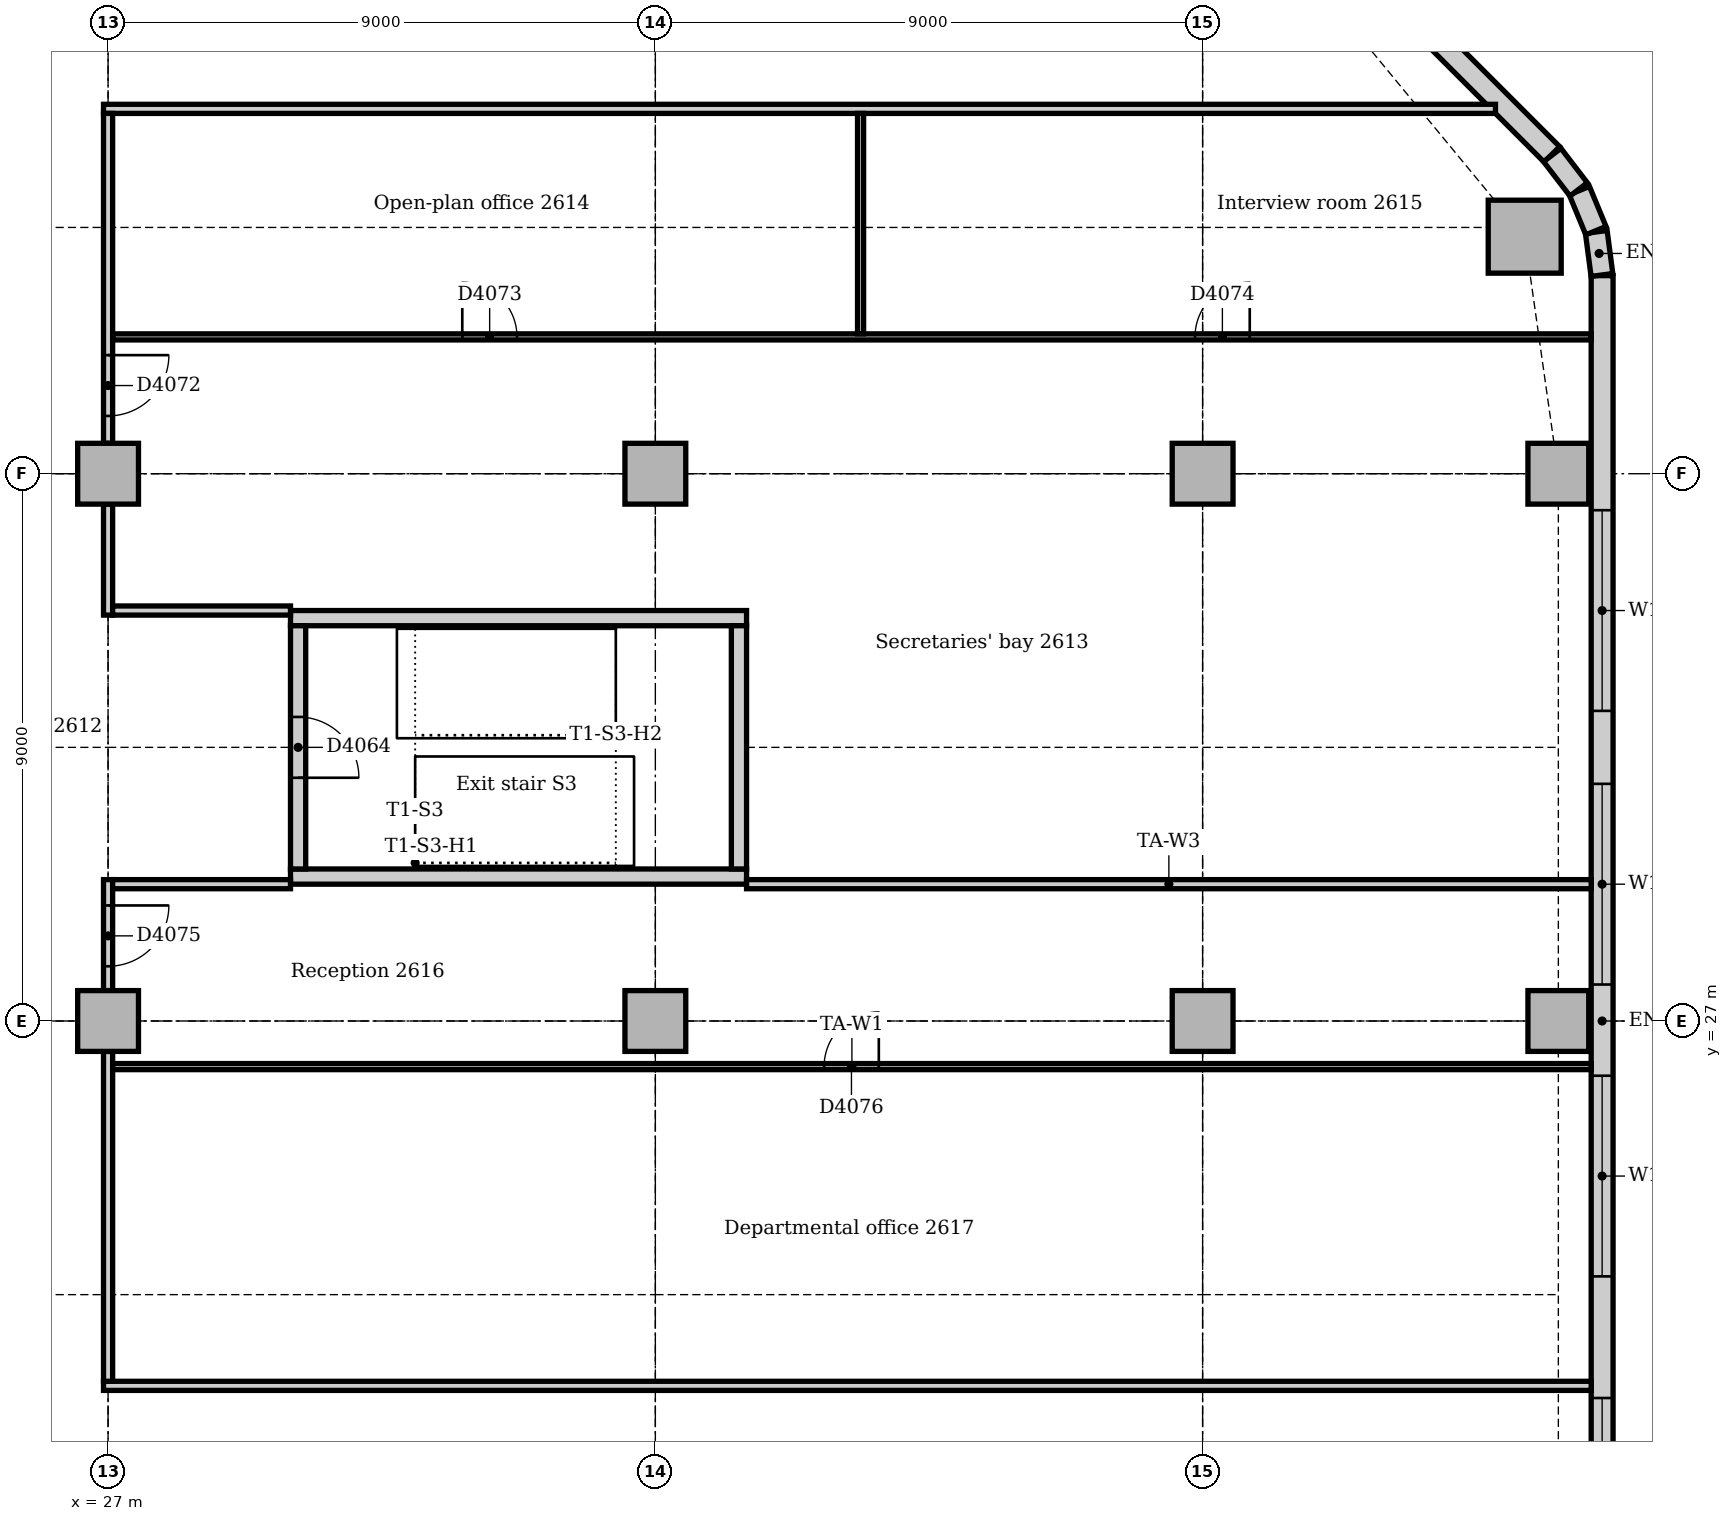
"""IFC4 building model, lengths in metres.
Left out: names, types, materials, properties, quantities, classifications, styles, units other than length and angle.
Written with IfcOpenShell. Run it as: python <this file> out.ifc"""

import sys

from ifc_helpers import new_model, si_unit, direction, frame, frame_2d, origin, origin_2d, place, context, subcontext, project, spatial, rectangle, extrude, element, fill, save


model = new_model("IFC4")
c1 = context("Model", 3, precision=1e-05, world=origin(), true_north=direction((0.0, 1.0)))
c2 = subcontext(c1, "Body", "Model", "MODEL_VIEW")
j1 = project(units=[si_unit("LENGTHUNIT", "METRE"), si_unit("PLANEANGLEUNIT", "RADIAN")], contexts=[c1])
p1 = place(None, origin())
s1 = spatial("IfcSite", under=j1, at=p1, CompositionType="ELEMENT")
p2 = place(p1, origin())
s2 = spatial("IfcBuilding", under=s1, at=p2, CompositionType="ELEMENT")
p3 = place(p2, frame((0.0, 0.0, 112.0)))
s3 = spatial("IfcBuildingStorey", under=s2, at=p3, CompositionType="ELEMENT", Elevation=112.0)
for number, where, z_axis, x_axis in (
    (1, (30.0, 29.375, 0.0), (0.0, 0.0, 1.0), (1.0, 0.0, 0.0)),
    (2, (37.5, 33.625, 0.0), (0.0, 0.0, 1.0), (-1.0, 0.0, 0.0)),
):
    element("IfcWall", number, at=place(p3, frame(where, z_axis=z_axis, x_axis=x_axis)), inside=s3, PredefinedType="SOLIDWALL", context=c2, shape_type="SweptSolid", body=[
        extrude(rectangle(XDim=7.5, YDim=0.25, at=frame_2d((3.75, 0.0))), origin(), (0.0, 0.0, 1.0), 4.0),
    ])
p4 = place(p3, frame((37.375, 29.5, 0.0), z_axis=(0.0, 0.0, 1.0), x_axis=(0.0, 1.0, 0.0)))
e3 = element("IfcWall", 3, at=p4, inside=s3, PredefinedType="SOLIDWALL", context=c2, shape_type="SweptSolid", body=[
    extrude(rectangle(XDim=4.0, YDim=0.25, at=frame_2d((2.0, 0.0))), origin(), (0.0, 0.0, 1.0), 4.0),
])
p5 = place(p3, frame((30.125, 33.5, 0.0), z_axis=(0.0, 0.0, 1.0), x_axis=(0.0, -1.0, 0.0)))
e4 = element("IfcWall", 4, at=p5, inside=s3, PredefinedType="SOLIDWALL", context=c2, shape_type="SweptSolid", body=[
    extrude(rectangle(XDim=4.0, YDim=0.25, at=frame_2d((2.0, 0.0))), origin(), (0.0, 0.0, 1.0), 4.0),
])
p6 = place(p5, frame((1.5, 0.0, 0.0)))
e5 = element("IfcOpeningElement", 5, at=p6, cuts=e4, PredefinedType="OPENING", context=c2, shape_type="SweptSolid", body=[
    extrude(rectangle(XDim=1.0, YDim=2.1, at=frame_2d((0.5, 1.05))), frame((0.0, 0.135, 0.0), z_axis=(0.0, -1.0, 0.0), x_axis=(1.0, 0.0, 0.0)), (0.0, 0.0, 1.0), 0.27),
])
p7 = place(p3, frame((50.297, 39.898, 0.0), z_axis=(0.0, 0.0, 1.0), x_axis=(1.0, 0.0, 0.0)))
e6 = element("IfcColumn", 6, at=p7, inside=s3, PredefinedType="COLUMN", context=c2, shape_type="SweptSolid", body=[
    extrude(rectangle(XDim=1.2, YDim=1.2, at=origin_2d()), origin(), (0.0, 0.0, 1.0), 3.85),
])
for number, where, z_axis, x_axis in (
    (7, (50.85, 27.0, 0.0), (0.0, 0.0, 1.0), (1.0, 0.0, 0.0)),
    (8, (50.85, 36.0, 0.0), (0.0, 0.0, 1.0), (1.0, 0.0, 0.0)),
    (9, (27.0, 27.0, 0.0), (0.0, 0.0, 1.0), (1.0, 0.0, 0.0)),
    (10, (27.0, 36.0, 0.0), (0.0, 0.0, 1.0), (1.0, 0.0, 0.0)),
    (11, (36.0, 27.0, 0.0), (0.0, 0.0, 1.0), (1.0, 0.0, 0.0)),
    (12, (36.0, 36.0, 0.0), (0.0, 0.0, 1.0), (1.0, 0.0, 0.0)),
    (13, (45.0, 27.0, 0.0), (0.0, 0.0, 1.0), (1.0, 0.0, 0.0)),
    (14, (45.0, 36.0, 0.0), (0.0, 0.0, 1.0), (1.0, 0.0, 0.0)),
):
    element("IfcColumn", number, at=place(p3, frame(where, z_axis=z_axis, x_axis=x_axis)), inside=s3, PredefinedType="COLUMN", context=c2, shape_type="SweptSolid", body=[
        extrude(rectangle(XDim=1.0, YDim=1.0, at=origin_2d()), origin(), (0.0, 0.0, 1.0), 3.85),
    ])
p8 = place(p3, frame((51.57, 14.743, 0.0), z_axis=(0.0, 0.0, 1.0), x_axis=(0.0, 1.0, 0.0)))
e15 = element("IfcWall", 15, at=p8, inside=s3, PredefinedType="STANDARD", context=c2, shape_type="SweptSolid", body=[
    extrude(rectangle(XDim=24.515, YDim=0.36, at=frame_2d((12.257, 0.0))), origin(), (0.0, 0.0, 1.0), 3.85),
])
p9 = place(p8, frame((4.257, 0.0, 0.9)))
e16 = element("IfcOpeningElement", 16, at=p9, cuts=e15, PredefinedType="OPENING", context=c2, shape_type="SweptSolid", body=[
    extrude(rectangle(XDim=1.8, YDim=1.6, at=frame_2d((0.9, 0.8))), frame((0.0, 0.19, 0.0), z_axis=(0.0, -1.0, 0.0), x_axis=(1.0, 0.0, 0.0)), (0.0, 0.0, 1.0), 0.38),
])
p10 = place(p8, frame((8.057, 0.0, 0.9)))
e17 = element("IfcOpeningElement", 17, at=p10, cuts=e15, PredefinedType="OPENING", context=c2, shape_type="SweptSolid", body=[
    extrude(rectangle(XDim=3.3, YDim=1.6, at=frame_2d((1.65, 0.8))), frame((0.0, 0.19, 0.0), z_axis=(0.0, -1.0, 0.0), x_axis=(1.0, 0.0, 0.0)), (0.0, 0.0, 1.0), 0.38),
])
p11 = place(p8, frame((12.857, 0.0, 0.9)))
e18 = element("IfcOpeningElement", 18, at=p11, cuts=e15, PredefinedType="OPENING", context=c2, shape_type="SweptSolid", body=[
    extrude(rectangle(XDim=3.3, YDim=1.6, at=frame_2d((1.65, 0.8))), frame((0.0, 0.19, 0.0), z_axis=(0.0, -1.0, 0.0), x_axis=(1.0, 0.0, 0.0)), (0.0, 0.0, 1.0), 0.38),
])
p12 = place(p8, frame((17.357, 0.0, 0.9)))
e19 = element("IfcOpeningElement", 19, at=p12, cuts=e15, PredefinedType="OPENING", context=c2, shape_type="SweptSolid", body=[
    extrude(rectangle(XDim=3.3, YDim=1.6, at=frame_2d((1.65, 0.8))), frame((0.0, 0.19, 0.0), z_axis=(0.0, -1.0, 0.0), x_axis=(1.0, 0.0, 0.0)), (0.0, 0.0, 1.0), 0.38),
])
p13 = place(p3, frame((50.744, 41.251, 0.0), z_axis=(0.0, 0.0, 1.0), x_axis=(-0.707106781187, 0.707106781187, 0.0)))
e20 = element("IfcWall", 20, at=p13, inside=s3, PredefinedType="STANDARD", context=c2, shape_type="SweptSolid", body=[
    extrude(rectangle(XDim=10.243, YDim=0.36, at=frame_2d((5.121, 0.0))), origin(), (0.0, 0.0, 1.0), 3.85),
])
p14 = place(p13, frame((3.471, 0.0, 0.9)))
e21 = element("IfcOpeningElement", 21, at=p14, cuts=e20, PredefinedType="OPENING", context=c2, shape_type="SweptSolid", body=[
    extrude(rectangle(XDim=3.3, YDim=1.6, at=frame_2d((1.65, 0.8))), frame((0.0, 0.19, 0.0), z_axis=(0.0, -1.0, 0.0), x_axis=(1.0, 0.0, 0.0)), (0.0, 0.0, 1.0), 0.38),
])
for number, where, z_axis, x_axis in (
    (22, (51.567, 39.269, 0.0), (0.0, 0.0, 1.0), (-0.131, 0.991, 0.0)),
    (23, (51.468, 39.997, 0.0), (0.0, 0.0, 1.0), (-0.383, 0.924, 0.0)),
):
    element("IfcWall", number, at=place(p3, frame(where, z_axis=z_axis, x_axis=x_axis)), inside=s3, PredefinedType="STANDARD", context=c2, shape_type="SweptSolid", body=[
        extrude(rectangle(XDim=0.713, YDim=0.36, at=frame_2d((0.356, 0.0))), origin(), (0.0, 0.0, 1.0), 3.85),
    ])
p15 = place(p3, frame((51.184, 40.675, 0.0), z_axis=(0.0, 0.0, 1.0), x_axis=(-0.608802368033, 0.793321924995, 0.0)))
e24 = element("IfcWall", 24, at=p15, inside=s3, PredefinedType="STANDARD", context=c2, shape_type="SweptSolid", body=[
    extrude(rectangle(XDim=0.713, YDim=0.36, at=frame_2d((0.357, 0.0))), origin(), (0.0, 0.0, 1.0), 3.85),
])
p16 = place(p3, frame((26.925, 21.0, 0.0), z_axis=(0.0, 0.0, 1.0), x_axis=(1.0, 0.0, 0.0)))
e25 = element("IfcWall", 25, at=p16, inside=s3, PredefinedType="PARTITIONING", context=c2, shape_type="SweptSolid", body=[
    extrude(rectangle(XDim=24.465, YDim=0.15, at=frame_2d((12.232, 0.0))), origin(), (0.0, 0.0, 1.0), 3.85),
])
p17 = place(p3, frame((26.925, 42.0, 0.0), z_axis=(0.0, 0.0, 1.0), x_axis=(1.0, 0.0, 0.0)))
e26 = element("IfcWall", 26, at=p17, inside=s3, PredefinedType="PARTITIONING", context=c2, shape_type="SweptSolid", body=[
    extrude(rectangle(XDim=22.891, YDim=0.15, at=frame_2d((11.445, 0.0))), origin(), (0.0, 0.0, 1.0), 3.85),
])
p18 = place(p3, frame((27.0, 21.075, 0.0), z_axis=(0.0, 0.0, 1.0), x_axis=(0.0, 1.0, 0.0)))
e27 = element("IfcWall", 27, at=p18, inside=s3, PredefinedType="PARTITIONING", context=c2, shape_type="SweptSolid", body=[
    extrude(rectangle(XDim=5.425, YDim=0.15, at=frame_2d((2.712, 0.0))), origin(), (0.0, 0.0, 1.0), 3.256),
])
p19 = place(p3, frame((27.0, 27.5, 0.0), z_axis=(0.0, 0.0, 1.0), x_axis=(0.0, 1.0, 0.0)))
e28 = element("IfcWall", 28, at=p19, inside=s3, PredefinedType="PARTITIONING", context=c2, shape_type="SweptSolid", body=[
    extrude(rectangle(XDim=1.825, YDim=0.15, at=frame_2d((0.912, 0.0))), origin(), (0.0, 0.0, 1.0), 3.256),
])
p20 = place(p19, frame((0.4, 0.0, 0.0)))
e29 = element("IfcOpeningElement", 29, at=p20, cuts=e28, PredefinedType="OPENING", context=c2, shape_type="SweptSolid", body=[
    extrude(rectangle(XDim=1.0, YDim=2.1, at=frame_2d((0.5, 1.05))), frame((0.0, 0.085, 0.0), z_axis=(0.0, -1.0, 0.0), x_axis=(1.0, 0.0, 0.0)), (0.0, 0.0, 1.0), 0.17),
])
p21 = place(p3, frame((27.0, 33.675, 0.0), z_axis=(0.0, 0.0, 1.0), x_axis=(0.0, 1.0, 0.0)))
e30 = element("IfcWall", 30, at=p21, inside=s3, PredefinedType="PARTITIONING", context=c2, shape_type="SweptSolid", body=[
    extrude(rectangle(XDim=1.825, YDim=0.15, at=frame_2d((0.912, 0.0))), origin(), (0.0, 0.0, 1.0), 3.256),
])
p22 = place(p3, frame((27.0, 36.5, 0.0), z_axis=(0.0, 0.0, 1.0), x_axis=(0.0, 1.0, 0.0)))
e31 = element("IfcWall", 31, at=p22, inside=s3, PredefinedType="PARTITIONING", context=c2, shape_type="SweptSolid", body=[
    extrude(rectangle(XDim=5.425, YDim=0.15, at=frame_2d((2.712, 0.0))), origin(), (0.0, 0.0, 1.0), 3.256),
])
p23 = place(p22, frame((0.45, 0.0, 0.0)))
e32 = element("IfcOpeningElement", 32, at=p23, cuts=e31, PredefinedType="OPENING", context=c2, shape_type="SweptSolid", body=[
    extrude(rectangle(XDim=1.0, YDim=2.1, at=frame_2d((0.5, 1.05))), frame((0.0, 0.085, 0.0), z_axis=(0.0, -1.0, 0.0), x_axis=(1.0, 0.0, 0.0)), (0.0, 0.0, 1.0), 0.17),
])
for number, where, z_axis, x_axis in (
    (33, (27.075, 29.25, 0.0), (0.0, 0.0, 1.0), (1.0, 0.0, 0.0)),
    (34, (27.075, 33.75, 0.0), (0.0, 0.0, 1.0), (1.0, 0.0, 0.0)),
):
    element("IfcWall", number, at=place(p3, frame(where, z_axis=z_axis, x_axis=x_axis)), inside=s3, PredefinedType="PARTITIONING", context=c2, shape_type="SweptSolid", body=[
        extrude(rectangle(XDim=2.925, YDim=0.15, at=frame_2d((1.462, 0.0))), origin(), (0.0, 0.0, 1.0), 3.85),
    ])
p24 = place(p3, frame((37.5, 29.25, 0.0), z_axis=(0.0, 0.0, 1.0), x_axis=(1.0, 0.0, 0.0)))
e35 = element("IfcWall", 35, at=p24, inside=s3, PredefinedType="PARTITIONING", context=c2, shape_type="SweptSolid", body=[
    extrude(rectangle(XDim=13.89, YDim=0.15, at=frame_2d((6.945, 0.0))), origin(), (0.0, 0.0, 1.0), 3.85),
])
p25 = place(p3, frame((27.075, 26.25, 0.0), z_axis=(0.0, 0.0, 1.0), x_axis=(1.0, 0.0, 0.0)))
e36 = element("IfcWall", 36, at=p25, inside=s3, PredefinedType="PARTITIONING", context=c2, shape_type="SweptSolid", body=[
    extrude(rectangle(XDim=24.315, YDim=0.1, at=frame_2d((12.158, 0.0))), origin(), (0.0, 0.0, 1.0), 3.85),
])
p26 = place(p25, frame((11.7, 0.0, 0.0)))
e37 = element("IfcOpeningElement", 37, at=p26, cuts=e36, PredefinedType="OPENING", context=c2, shape_type="SweptSolid", body=[
    extrude(rectangle(XDim=0.9, YDim=2.1, at=frame_2d((0.45, 1.05))), frame((0.0, 0.06, 0.0), z_axis=(0.0, -1.0, 0.0), x_axis=(1.0, 0.0, 0.0)), (0.0, 0.0, 1.0), 0.12),
])
p27 = place(p3, frame((27.075, 38.25, 0.0), z_axis=(0.0, 0.0, 1.0), x_axis=(1.0, 0.0, 0.0)))
e38 = element("IfcWall", 38, at=p27, inside=s3, PredefinedType="PARTITIONING", context=c2, shape_type="SweptSolid", body=[
    extrude(rectangle(XDim=24.315, YDim=0.1, at=frame_2d((12.158, 0.0))), origin(), (0.0, 0.0, 1.0), 3.85),
])
p28 = place(p27, frame((5.75, 0.0, 0.0)))
e39 = element("IfcOpeningElement", 39, at=p28, cuts=e38, PredefinedType="OPENING", context=c2, shape_type="SweptSolid", body=[
    extrude(rectangle(XDim=0.9, YDim=2.1, at=frame_2d((0.45, 1.05))), frame((0.0, 0.06, 0.0), z_axis=(0.0, -1.0, 0.0), x_axis=(1.0, 0.0, 0.0)), (0.0, 0.0, 1.0), 0.12),
])
p29 = place(p27, frame((17.8, 0.0, 0.0)))
e40 = element("IfcOpeningElement", 40, at=p29, cuts=e38, PredefinedType="OPENING", context=c2, shape_type="SweptSolid", body=[
    extrude(rectangle(XDim=0.9, YDim=2.1, at=frame_2d((0.45, 1.05))), frame((0.0, 0.06, 0.0), z_axis=(0.0, -1.0, 0.0), x_axis=(1.0, 0.0, 0.0)), (0.0, 0.0, 1.0), 0.12),
])
p30 = place(p3, frame((39.375, 38.3, 0.0), z_axis=(0.0, 0.0, 1.0), x_axis=(0.0, 1.0, 0.0)))
e41 = element("IfcWall", 41, at=p30, inside=s3, PredefinedType="PARTITIONING", context=c2, shape_type="SweptSolid", body=[
    extrude(rectangle(XDim=3.625, YDim=0.1, at=frame_2d((1.812, 0.0))), origin(), (0.0, 0.0, 1.0), 3.85),
])
p31 = place(p9, origin())
e42 = element("IfcWindow", 42, at=p31, inside=s3, PartitioningType="SINGLE_PANEL", PredefinedType="WINDOW", context=c2, shape_type="SweptSolid", body=[
    extrude(rectangle(XDim=1.8, YDim=1.6, at=frame_2d((0.9, 0.8))), frame((0.0, 0.13, 0.0), z_axis=(0.0, -1.0, 0.0), x_axis=(1.0, 0.0, 0.0)), (0.0, 0.0, 1.0), 0.06),
])
fill(e16, e42)
p32 = place(p10, origin())
e43 = element("IfcWindow", 43, at=p32, inside=s3, PartitioningType="SINGLE_PANEL", PredefinedType="WINDOW", context=c2, shape_type="SweptSolid", body=[
    extrude(rectangle(XDim=3.3, YDim=1.6, at=frame_2d((1.65, 0.8))), frame((0.0, 0.13, 0.0), z_axis=(0.0, -1.0, 0.0), x_axis=(1.0, 0.0, 0.0)), (0.0, 0.0, 1.0), 0.06),
])
fill(e17, e43)
p33 = place(p11, origin())
e44 = element("IfcWindow", 44, at=p33, inside=s3, PartitioningType="SINGLE_PANEL", PredefinedType="WINDOW", context=c2, shape_type="SweptSolid", body=[
    extrude(rectangle(XDim=3.3, YDim=1.6, at=frame_2d((1.65, 0.8))), frame((0.0, 0.13, 0.0), z_axis=(0.0, -1.0, 0.0), x_axis=(1.0, 0.0, 0.0)), (0.0, 0.0, 1.0), 0.06),
])
fill(e18, e44)
p34 = place(p12, origin())
e45 = element("IfcWindow", 45, at=p34, inside=s3, PartitioningType="SINGLE_PANEL", PredefinedType="WINDOW", context=c2, shape_type="SweptSolid", body=[
    extrude(rectangle(XDim=3.3, YDim=1.6, at=frame_2d((1.65, 0.8))), frame((0.0, 0.13, 0.0), z_axis=(0.0, -1.0, 0.0), x_axis=(1.0, 0.0, 0.0)), (0.0, 0.0, 1.0), 0.06),
])
fill(e19, e45)
p35 = place(p6, origin())
e46 = element("IfcDoor", 46, at=p35, inside=s3, OperationType="SINGLE_SWING_RIGHT", PredefinedType="DOOR", context=c2, shape_type="SweptSolid", body=[
    extrude(rectangle(XDim=1.0, YDim=2.1, at=frame_2d((0.5, 1.05))), frame((0.0, 0.025, 0.0), z_axis=(0.0, -1.0, 0.0), x_axis=(1.0, 0.0, 0.0)), (0.0, 0.0, 1.0), 0.05),
])
fill(e5, e46)
p36 = place(p23, frame((1.0, 0.0, 0.0), z_axis=(0.0, 0.0, 1.0), x_axis=(-1.0, 0.0, 0.0)))
e47 = element("IfcDoor", 47, at=p36, inside=s3, OperationType="SINGLE_SWING_LEFT", PredefinedType="DOOR", context=c2, shape_type="SweptSolid", body=[
    extrude(rectangle(XDim=1.0, YDim=2.1, at=frame_2d((0.5, 1.05))), frame((0.0, 0.025, 0.0), z_axis=(0.0, -1.0, 0.0), x_axis=(1.0, 0.0, 0.0)), (0.0, 0.0, 1.0), 0.05),
])
fill(e32, e47)
p37 = place(p28, origin())
e48 = element("IfcDoor", 48, at=p37, inside=s3, OperationType="SINGLE_SWING_LEFT", PredefinedType="DOOR", context=c2, shape_type="SweptSolid", body=[
    extrude(rectangle(XDim=0.9, YDim=2.1, at=frame_2d((0.45, 1.05))), frame((0.0, 0.025, 0.0), z_axis=(0.0, -1.0, 0.0), x_axis=(1.0, 0.0, 0.0)), (0.0, 0.0, 1.0), 0.05),
])
fill(e39, e48)
p38 = place(p29, origin())
e49 = element("IfcDoor", 49, at=p38, inside=s3, OperationType="SINGLE_SWING_RIGHT", PredefinedType="DOOR", context=c2, shape_type="SweptSolid", body=[
    extrude(rectangle(XDim=0.9, YDim=2.1, at=frame_2d((0.45, 1.05))), frame((0.0, 0.025, 0.0), z_axis=(0.0, -1.0, 0.0), x_axis=(1.0, 0.0, 0.0)), (0.0, 0.0, 1.0), 0.05),
])
fill(e40, e49)
p39 = place(p20, frame((1.0, 0.0, 0.0), z_axis=(0.0, 0.0, 1.0), x_axis=(-1.0, 0.0, 0.0)))
e50 = element("IfcDoor", 50, at=p39, inside=s3, OperationType="SINGLE_SWING_LEFT", PredefinedType="DOOR", context=c2, shape_type="SweptSolid", body=[
    extrude(rectangle(XDim=1.0, YDim=2.1, at=frame_2d((0.5, 1.05))), frame((0.0, 0.025, 0.0), z_axis=(0.0, -1.0, 0.0), x_axis=(1.0, 0.0, 0.0)), (0.0, 0.0, 1.0), 0.05),
])
fill(e29, e50)
p40 = place(p26, origin())
e51 = element("IfcDoor", 51, at=p40, inside=s3, OperationType="SINGLE_SWING_RIGHT", PredefinedType="DOOR", context=c2, shape_type="SweptSolid", body=[
    extrude(rectangle(XDim=0.9, YDim=2.1, at=frame_2d((0.45, 1.05))), frame((0.0, 0.025, 0.0), z_axis=(0.0, -1.0, 0.0), x_axis=(1.0, 0.0, 0.0)), (0.0, 0.0, 1.0), 0.05),
])
fill(e37, e51)
save(model, sys.argv[1])
